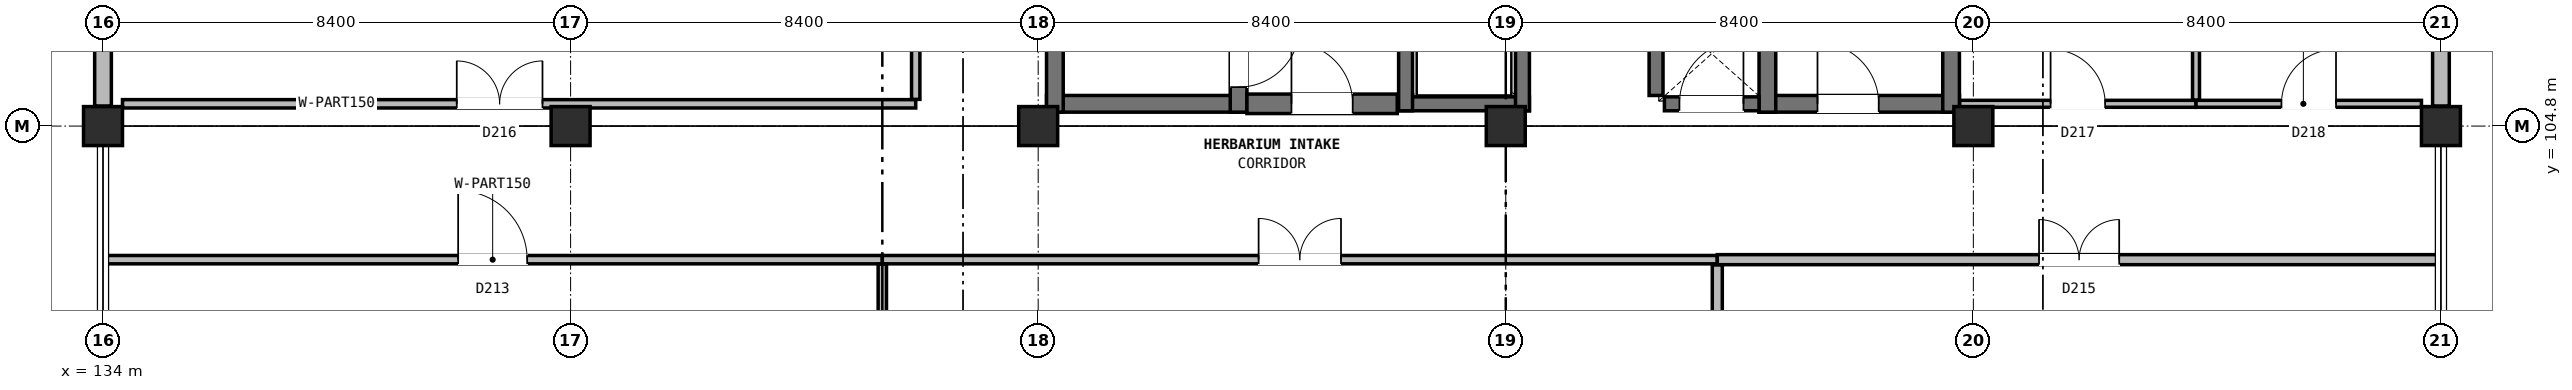
"""IFC4 building model, lengths in metres.
Left out: names, types, materials, properties, quantities, classifications, styles, units other than length and angle.
Written with IfcOpenShell. Run it as: python <this file> out.ifc"""

import sys

from ifc_helpers import new_model, si_unit, direction, frame, frame_2d, origin, origin_2d, place, context, subcontext, project, spatial, rectangle, extrude, element, fill, save


model = new_model("IFC4")
c1 = context("Model", 3, precision=1e-05, world=origin(), true_north=direction((0.0, 1.0)))
c2 = subcontext(c1, "Body", "Model", "MODEL_VIEW")
j1 = project(units=[si_unit("LENGTHUNIT", "METRE"), si_unit("PLANEANGLEUNIT", "RADIAN")], contexts=[c1])
p1 = place(None, origin())
s1 = spatial("IfcSite", under=j1, at=p1, CompositionType="ELEMENT")
p2 = place(p1, origin())
s2 = spatial("IfcBuilding", under=s1, at=p2, CompositionType="ELEMENT")
p3 = place(p2, frame((0.0, 0.0, 24.8)))
s3 = spatial("IfcBuildingStorey", under=s2, at=p3, CompositionType="ELEMENT", Elevation=24.8)
for number, where, z_axis, x_axis in (
    (1, (134.0, 104.8, 0.0), (0.0, 0.0, 1.0), (1.0, 0.0, 0.0)),
    (2, (142.4, 104.8, 0.0), (0.0, 0.0, 1.0), (1.0, 0.0, 0.0)),
    (3, (150.8, 104.8, 0.0), (0.0, 0.0, 1.0), (1.0, 0.0, 0.0)),
    (4, (159.2, 104.8, 0.0), (0.0, 0.0, 1.0), (1.0, 0.0, 0.0)),
    (5, (167.6, 104.8, 0.0), (0.0, 0.0, 1.0), (1.0, 0.0, 0.0)),
    (6, (176.0, 104.8, 0.0), (0.0, 0.0, 1.0), (1.0, 0.0, 0.0)),
):
    element("IfcColumn", number, at=place(p3, frame(where, z_axis=z_axis, x_axis=x_axis)), inside=s3, PredefinedType="COLUMN", context=c2, shape_type="SweptSolid", body=[
        extrude(rectangle(XDim=0.7, YDim=0.7, at=origin_2d()), origin(), (0.0, 0.0, 1.0), 4.0),
    ])
p4 = place(p3, frame((176.0, 105.16, 0.0), z_axis=(0.0, 0.0, 1.0), x_axis=(0.0, 1.0, 0.0)))
e7 = element("IfcWall", 7, at=p4, inside=s3, PredefinedType="SOLIDWALL", context=c2, shape_type="SweptSolid", body=[
    extrude(rectangle(XDim=8.08, YDim=0.3, at=frame_2d((4.04, 0.0))), origin(), (0.0, 0.0, 1.0), 3.15),
])
p5 = place(p4, frame((3.48, 0.0, 0.9)))
e8 = element("IfcOpeningElement", 8, at=p5, cuts=e7, PredefinedType="OPENING", context=c2, shape_type="SweptSolid", body=[
    extrude(rectangle(XDim=1.16, YDim=1.74, at=frame_2d((0.58, 0.87))), frame((0.0, 0.16, 0.0), z_axis=(0.0, -1.0, 0.0), x_axis=(1.0, 0.0, 0.0)), (0.0, 0.0, 1.0), 0.32),
])
p6 = place(p3, frame((134.0, 113.24, 0.0), z_axis=(0.0, 0.0, 1.0), x_axis=(0.0, -1.0, 0.0)))
e9 = element("IfcWall", 9, at=p6, inside=s3, PredefinedType="SOLIDWALL", context=c2, shape_type="SweptSolid", body=[
    extrude(rectangle(XDim=8.08, YDim=0.3, at=frame_2d((4.04, 0.0))), origin(), (0.0, 0.0, 1.0), 3.15),
])
p7 = place(p6, frame((2.98, 0.0, 0.9)))
e10 = element("IfcOpeningElement", 10, at=p7, cuts=e9, PredefinedType="OPENING", context=c2, shape_type="SweptSolid", body=[
    extrude(rectangle(XDim=2.08, YDim=2.04, at=frame_2d((1.04, 1.02))), frame((0.0, 0.16, 0.0), z_axis=(0.0, -1.0, 0.0), x_axis=(1.0, 0.0, 0.0)), (0.0, 0.0, 1.0), 0.32),
])
p8 = place(p3, frame((150.95, 105.2, 0.0), z_axis=(0.0, 0.0, 1.0), x_axis=(1.0, 0.0, 0.0)))
e11 = element("IfcWall", 11, at=p8, inside=s3, PredefinedType="SHEAR", context=c2, shape_type="SweptSolid", body=[
    extrude(rectangle(XDim=3.6, YDim=0.3, at=frame_2d((1.8, 0.0))), origin(), (0.0, 0.0, 1.0), 4.0),
])
p9 = place(p3, frame((151.1, 105.05, 0.0), z_axis=(0.0, 0.0, 1.0), x_axis=(0.0, 1.0, 0.0)))
e12 = element("IfcWall", 12, at=p9, inside=s3, PredefinedType="SHEAR", context=c2, shape_type="SweptSolid", body=[
    extrude(rectangle(XDim=8.3, YDim=0.3, at=frame_2d((4.15, 0.0))), origin(), (0.0, 0.0, 1.0), 4.0),
])
p10 = place(p3, frame((154.4, 105.05, 0.0), z_axis=(0.0, 0.0, 1.0), x_axis=(0.0, 1.0, 0.0)))
e13 = element("IfcWall", 13, at=p10, inside=s3, PredefinedType="SHEAR", context=c2, shape_type="SweptSolid", body=[
    extrude(rectangle(XDim=8.3, YDim=0.3, at=frame_2d((4.15, 0.0))), origin(), (0.0, 0.0, 1.0), 4.0),
])
p11 = place(p10, frame((0.45, 0.0, 0.0)))
e14 = element("IfcOpeningElement", 14, at=p11, cuts=e13, PredefinedType="OPENING", context=c2, shape_type="SweptSolid", body=[
    extrude(rectangle(XDim=1.1, YDim=2.2, at=frame_2d((0.55, 1.1))), frame((0.0, 0.16, 0.0), z_axis=(0.0, -1.0, 0.0), x_axis=(1.0, 0.0, 0.0)), (0.0, 0.0, 1.0), 0.32),
])
p12 = place(p3, frame((163.75, 105.2, 0.0), z_axis=(0.0, 0.0, 1.0), x_axis=(1.0, 0.0, 0.0)))
e15 = element("IfcWall", 15, at=p12, inside=s3, PredefinedType="SHEAR", context=c2, shape_type="SweptSolid", body=[
    extrude(rectangle(XDim=3.6, YDim=0.3, at=frame_2d((1.8, 0.0))), origin(), (0.0, 0.0, 1.0), 4.0),
])
p13 = place(p12, frame((1.05, 0.0, 0.0)))
e16 = element("IfcOpeningElement", 16, at=p13, cuts=e15, PredefinedType="OPENING", context=c2, shape_type="SweptSolid", body=[
    extrude(rectangle(XDim=1.1, YDim=2.2, at=frame_2d((0.55, 1.1))), frame((0.0, 0.16, 0.0), z_axis=(0.0, -1.0, 0.0), x_axis=(1.0, 0.0, 0.0)), (0.0, 0.0, 1.0), 0.32),
])
for number, where, z_axis, x_axis in (
    (17, (163.9, 105.05, 0.0), (0.0, 0.0, 1.0), (0.0, 1.0, 0.0)),
    (18, (167.2, 105.05, 0.0), (0.0, 0.0, 1.0), (0.0, 1.0, 0.0)),
):
    element("IfcWall", number, at=place(p3, frame(where, z_axis=z_axis, x_axis=x_axis)), inside=s3, PredefinedType="SHEAR", context=c2, shape_type="SweptSolid", body=[
        extrude(rectangle(XDim=8.3, YDim=0.3, at=frame_2d((4.15, 0.0))), origin(), (0.0, 0.0, 1.0), 4.0),
    ])
p14 = place(p3, frame((157.275, 105.2, 0.0), z_axis=(0.0, 0.0, 1.0), x_axis=(1.0, 0.0, 0.0)))
e19 = element("IfcWall", 19, at=p14, inside=s3, PredefinedType="SOLIDWALL", context=c2, shape_type="SweptSolid", body=[
    extrude(rectangle(XDim=2.35, YDim=0.25, at=frame_2d((1.175, 0.0))), origin(), (0.0, 0.0, 1.0), 3.68),
])
for number, where, z_axis, x_axis in (
    (20, (157.4, 105.075, 0.0), (0.0, 0.0, 1.0), (0.0, 1.0, 0.0)),
    (21, (159.5, 105.075, 0.0), (0.0, 0.0, 1.0), (0.0, 1.0, 0.0)),
):
    element("IfcWall", number, at=place(p3, frame(where, z_axis=z_axis, x_axis=x_axis)), inside=s3, PredefinedType="SOLIDWALL", context=c2, shape_type="SweptSolid", body=[
        extrude(rectangle(XDim=2.65, YDim=0.25, at=frame_2d((1.325, 0.0))), origin(), (0.0, 0.0, 1.0), 3.68),
    ])
p15 = place(p3, frame((154.55, 105.2, 0.0), z_axis=(0.0, 0.0, 1.0), x_axis=(1.0, 0.0, 0.0)))
e22 = element("IfcWall", 22, at=p15, inside=s3, PredefinedType="SHEAR", context=c2, shape_type="SweptSolid", body=[
    extrude(rectangle(XDim=2.7, YDim=0.35, at=frame_2d((1.35, 0.0))), origin(), (0.0, 0.0, 1.0), 3.68),
])
p16 = place(p15, frame((0.8, 0.0, 0.0)))
e23 = element("IfcOpeningElement", 23, at=p16, cuts=e22, PredefinedType="OPENING", context=c2, shape_type="SweptSolid", body=[
    extrude(rectangle(XDim=1.1, YDim=2.2, at=frame_2d((0.55, 1.1))), frame((0.0, 0.185, 0.0), z_axis=(0.0, -1.0, 0.0), x_axis=(1.0, 0.0, 0.0)), (0.0, 0.0, 1.0), 0.37),
])
p17 = place(p3, frame((161.9, 105.35, 0.0), z_axis=(0.0, 0.0, 1.0), x_axis=(0.0, 1.0, 0.0)))
e24 = element("IfcWall", 24, at=p17, inside=s3, PredefinedType="SOLIDWALL", context=c2, shape_type="SweptSolid", body=[
    extrude(rectangle(XDim=1.5, YDim=0.25, at=frame_2d((0.75, 0.0))), origin(), (0.0, 0.0, 1.0), 3.68),
])
p18 = place(p3, frame((162.05, 105.2, 0.0), z_axis=(0.0, 0.0, 1.0), x_axis=(1.0, 0.0, 0.0)))
e25 = element("IfcWall", 25, at=p18, inside=s3, PredefinedType="SOLIDWALL", context=c2, shape_type="SweptSolid", body=[
    extrude(rectangle(XDim=1.7, YDim=0.25, at=frame_2d((0.85, 0.0))), origin(), (0.0, 0.0, 1.0), 3.68),
])
p19 = place(p18, frame((0.27, 0.0, 0.0)))
e26 = element("IfcOpeningElement", 26, at=p19, cuts=e25, PredefinedType="OPENING", context=c2, shape_type="SweptSolid", body=[
    extrude(rectangle(XDim=1.15, YDim=2.2, at=frame_2d((0.575, 1.1))), frame((0.0, 0.135, 0.0), z_axis=(0.0, -1.0, 0.0), x_axis=(1.0, 0.0, 0.0)), (0.0, 0.0, 1.0), 0.27),
])
p20 = place(p3, frame((134.0, 102.4, 0.0), z_axis=(0.0, 0.0, 1.0), x_axis=(1.0, 0.0, 0.0)))
e27 = element("IfcWall", 27, at=p20, inside=s3, PredefinedType="PARTITIONING", context=c2, shape_type="SweptSolid", body=[
    extrude(rectangle(XDim=14.0, YDim=0.15, at=frame_2d((7.0, 0.0))), origin(), (0.0, 0.0, 1.0), 3.665),
])
p21 = place(p20, frame((6.38, 0.0, 0.0)))
e28 = element("IfcOpeningElement", 28, at=p21, cuts=e27, PredefinedType="OPENING", context=c2, shape_type="SweptSolid", body=[
    extrude(rectangle(XDim=1.24, YDim=2.26, at=frame_2d((0.62, 1.13))), frame((0.0, 0.085, 0.0), z_axis=(0.0, -1.0, 0.0), x_axis=(1.0, 0.0, 0.0)), (0.0, 0.0, 1.0), 0.17),
])
p22 = place(p3, frame((148.0, 102.4, 0.0), z_axis=(0.0, 0.0, 1.0), x_axis=(1.0, 0.0, 0.0)))
e29 = element("IfcWall", 29, at=p22, inside=s3, PredefinedType="PARTITIONING", context=c2, shape_type="SweptSolid", body=[
    extrude(rectangle(XDim=15.0, YDim=0.15, at=frame_2d((7.5, 0.0))), origin(), (0.0, 0.0, 1.0), 3.665),
])
p23 = place(p22, frame((6.76, 0.0, 0.0)))
e30 = element("IfcOpeningElement", 30, at=p23, cuts=e29, PredefinedType="OPENING", context=c2, shape_type="SweptSolid", body=[
    extrude(rectangle(XDim=1.48, YDim=2.2, at=frame_2d((0.74, 1.1))), frame((0.0, 0.085, 0.0), z_axis=(0.0, -1.0, 0.0), x_axis=(1.0, 0.0, 0.0)), (0.0, 0.0, 1.0), 0.17),
])
p24 = place(p3, frame((163.0, 102.4, 0.0), z_axis=(0.0, 0.0, 1.0), x_axis=(1.0, 0.0, 0.0)))
e31 = element("IfcWall", 31, at=p24, inside=s3, PredefinedType="PARTITIONING", context=c2, shape_type="SweptSolid", body=[
    extrude(rectangle(XDim=13.0, YDim=0.18, at=frame_2d((6.5, 0.0))), origin(), (0.0, 0.0, 1.0), 3.665),
])
p25 = place(p24, frame((5.78, 0.0, 0.0)))
e32 = element("IfcOpeningElement", 32, at=p25, cuts=e31, PredefinedType="OPENING", context=c2, shape_type="SweptSolid", body=[
    extrude(rectangle(XDim=1.44, YDim=2.26, at=frame_2d((0.72, 1.13))), frame((0.0, 0.1, 0.0), z_axis=(0.0, -1.0, 0.0), x_axis=(1.0, 0.0, 0.0)), (0.0, 0.0, 1.0), 0.2),
])
p26 = place(p3, frame((134.35, 105.2, 0.0), z_axis=(0.0, 0.0, 1.0), x_axis=(1.0, 0.0, 0.0)))
e33 = element("IfcWall", 33, at=p26, inside=s3, PredefinedType="PARTITIONING", context=c2, shape_type="SweptSolid", body=[
    extrude(rectangle(XDim=14.25, YDim=0.15, at=frame_2d((7.125, 0.0))), origin(), (0.0, 0.0, 1.0), 3.145),
])
p27 = place(p26, frame((6.005, 0.0, 0.0)))
e34 = element("IfcOpeningElement", 34, at=p27, cuts=e33, PredefinedType="OPENING", context=c2, shape_type="SweptSolid", body=[
    extrude(rectangle(XDim=1.54, YDim=2.3, at=frame_2d((0.77, 1.15))), frame((0.0, 0.085, 0.0), z_axis=(0.0, -1.0, 0.0), x_axis=(1.0, 0.0, 0.0)), (0.0, 0.0, 1.0), 0.17),
])
p28 = place(p3, frame((167.355, 105.2, 0.0), z_axis=(0.0, 0.0, 1.0), x_axis=(1.0, 0.0, 0.0)))
e35 = element("IfcWall", 35, at=p28, inside=s3, PredefinedType="PARTITIONING", context=c2, shape_type="SweptSolid", body=[
    extrude(rectangle(XDim=4.245, YDim=0.125, at=frame_2d((2.123, 0.0))), origin(), (0.0, 0.0, 1.0), 3.145),
])
p29 = place(p28, frame((1.633, 0.0, 0.0)))
e36 = element("IfcOpeningElement", 36, at=p29, cuts=e35, PredefinedType="OPENING", context=c2, shape_type="SweptSolid", body=[
    extrude(rectangle(XDim=0.98, YDim=2.1, at=frame_2d((0.49, 1.05))), frame((0.0, 0.073, 0.0), z_axis=(0.0, -1.0, 0.0), x_axis=(1.0, 0.0, 0.0)), (0.0, 0.0, 1.0), 0.145),
])
p30 = place(p3, frame((171.6, 105.2, 0.0), z_axis=(0.0, 0.0, 1.0), x_axis=(1.0, 0.0, 0.0)))
e37 = element("IfcWall", 37, at=p30, inside=s3, PredefinedType="PARTITIONING", context=c2, shape_type="SweptSolid", body=[
    extrude(rectangle(XDim=4.05, YDim=0.125, at=frame_2d((2.025, 0.0))), origin(), (0.0, 0.0, 1.0), 3.145),
])
p31 = place(p30, frame((1.535, 0.0, 0.0)))
e38 = element("IfcOpeningElement", 38, at=p31, cuts=e37, PredefinedType="OPENING", context=c2, shape_type="SweptSolid", body=[
    extrude(rectangle(XDim=0.98, YDim=2.1, at=frame_2d((0.49, 1.05))), frame((0.0, 0.073, 0.0), z_axis=(0.0, -1.0, 0.0), x_axis=(1.0, 0.0, 0.0)), (0.0, 0.0, 1.0), 0.145),
])
p32 = place(p3, frame((148.6, 105.28, 0.0), z_axis=(0.0, 0.0, 1.0), x_axis=(0.0, 1.0, 0.0)))
e39 = element("IfcWall", 39, at=p32, inside=s3, PredefinedType="PARTITIONING", context=c2, shape_type="SweptSolid", body=[
    extrude(rectangle(XDim=14.12, YDim=0.15, at=frame_2d((7.06, 0.0))), origin(), (0.0, 0.0, 1.0), 3.665),
])
p33 = place(p3, frame((148.0, 87.355, 0.0), z_axis=(0.0, 0.0, 1.0), x_axis=(0.0, 1.0, 0.0)))
e40 = element("IfcWall", 40, at=p33, inside=s3, PredefinedType="PARTITIONING", context=c2, shape_type="SweptSolid", body=[
    extrude(rectangle(XDim=14.965, YDim=0.15, at=frame_2d((7.482, 0.0))), origin(), (0.0, 0.0, 1.0), 3.665),
])
p34 = place(p3, frame((163.0, 87.355, 0.0), z_axis=(0.0, 0.0, 1.0), x_axis=(0.0, 1.0, 0.0)))
e41 = element("IfcWall", 41, at=p34, inside=s3, PredefinedType="PARTITIONING", context=c2, shape_type="SweptSolid", body=[
    extrude(rectangle(XDim=14.95, YDim=0.18, at=frame_2d((7.475, 0.0))), origin(), (0.0, 0.0, 1.0), 3.665),
])
p35 = place(p3, frame((171.6, 105.268, 0.0), z_axis=(0.0, 0.0, 1.0), x_axis=(0.0, 1.0, 0.0)))
e42 = element("IfcWall", 42, at=p35, inside=s3, PredefinedType="PARTITIONING", context=c2, shape_type="SweptSolid", body=[
    extrude(rectangle(XDim=16.978, YDim=0.125, at=frame_2d((8.489, 0.0))), origin(), (0.0, 0.0, 1.0), 3.665),
])
p36 = place(p11, frame((1.1, 0.0, 0.0), z_axis=(0.0, 0.0, 1.0), x_axis=(-1.0, 0.0, 0.0)))
e43 = element("IfcDoor", 43, at=p36, inside=s3, OperationType="SINGLE_SWING_RIGHT", PredefinedType="DOOR", context=c2, shape_type="SweptSolid", body=[
    extrude(rectangle(XDim=1.1, YDim=2.2, at=frame_2d((0.55, 1.1))), frame((0.0, 0.025, 0.0), z_axis=(0.0, -1.0, 0.0), x_axis=(1.0, 0.0, 0.0)), (0.0, 0.0, 1.0), 0.05),
])
fill(e14, e43)
p37 = place(p13, origin())
e44 = element("IfcDoor", 44, at=p37, inside=s3, OperationType="SINGLE_SWING_LEFT", PredefinedType="DOOR", context=c2, shape_type="SweptSolid", body=[
    extrude(rectangle(XDim=1.1, YDim=2.2, at=frame_2d((0.55, 1.1))), frame((0.0, 0.025, 0.0), z_axis=(0.0, -1.0, 0.0), x_axis=(1.0, 0.0, 0.0)), (0.0, 0.0, 1.0), 0.05),
])
fill(e16, e44)
p38 = place(p16, origin())
e45 = element("IfcDoor", 45, at=p38, inside=s3, OperationType="SINGLE_SWING_LEFT", PredefinedType="DOOR", context=c2, shape_type="SweptSolid", body=[
    extrude(rectangle(XDim=1.1, YDim=2.2, at=frame_2d((0.55, 1.1))), frame((0.0, 0.025, 0.0), z_axis=(0.0, -1.0, 0.0), x_axis=(1.0, 0.0, 0.0)), (0.0, 0.0, 1.0), 0.05),
])
fill(e23, e45)
p39 = place(p19, origin())
e46 = element("IfcDoor", 46, at=p39, inside=s3, OperationType="SINGLE_SWING_RIGHT", PredefinedType="DOOR", context=c2, shape_type="SweptSolid", body=[
    extrude(rectangle(XDim=1.15, YDim=2.2, at=frame_2d((0.575, 1.1))), frame((0.0, 0.025, 0.0), z_axis=(0.0, -1.0, 0.0), x_axis=(1.0, 0.0, 0.0)), (0.0, 0.0, 1.0), 0.05),
])
fill(e26, e46)
p40 = place(p21, origin())
e47 = element("IfcDoor", 47, at=p40, inside=s3, OperationType="SINGLE_SWING_LEFT", PredefinedType="DOOR", context=c2, shape_type="SweptSolid", body=[
    extrude(rectangle(XDim=1.24, YDim=2.26, at=frame_2d((0.62, 1.13))), frame((0.0, 0.025, 0.0), z_axis=(0.0, -1.0, 0.0), x_axis=(1.0, 0.0, 0.0)), (0.0, 0.0, 1.0), 0.05),
])
fill(e28, e47)
p41 = place(p23, origin())
e48 = element("IfcDoor", 48, at=p41, inside=s3, OperationType="DOUBLE_DOOR_SINGLE_SWING", PredefinedType="DOOR", context=c2, shape_type="SweptSolid", body=[
    extrude(rectangle(XDim=1.48, YDim=2.2, at=frame_2d((0.74, 1.1))), frame((0.0, 0.025, 0.0), z_axis=(0.0, -1.0, 0.0), x_axis=(1.0, 0.0, 0.0)), (0.0, 0.0, 1.0), 0.05),
])
fill(e30, e48)
p42 = place(p25, origin())
e49 = element("IfcDoor", 49, at=p42, inside=s3, OperationType="DOUBLE_DOOR_SINGLE_SWING", PredefinedType="DOOR", context=c2, shape_type="SweptSolid", body=[
    extrude(rectangle(XDim=1.44, YDim=2.26, at=frame_2d((0.72, 1.13))), frame((0.0, 0.025, 0.0), z_axis=(0.0, -1.0, 0.0), x_axis=(1.0, 0.0, 0.0)), (0.0, 0.0, 1.0), 0.05),
])
fill(e32, e49)
p43 = place(p27, origin())
e50 = element("IfcDoor", 50, at=p43, inside=s3, OperationType="DOUBLE_DOOR_SINGLE_SWING", PredefinedType="DOOR", context=c2, shape_type="SweptSolid", body=[
    extrude(rectangle(XDim=1.54, YDim=2.3, at=frame_2d((0.77, 1.15))), frame((0.0, 0.025, 0.0), z_axis=(0.0, -1.0, 0.0), x_axis=(1.0, 0.0, 0.0)), (0.0, 0.0, 1.0), 0.05),
])
fill(e34, e50)
p44 = place(p29, origin())
e51 = element("IfcDoor", 51, at=p44, inside=s3, OperationType="SINGLE_SWING_LEFT", PredefinedType="DOOR", context=c2, shape_type="SweptSolid", body=[
    extrude(rectangle(XDim=0.98, YDim=2.1, at=frame_2d((0.49, 1.05))), frame((0.0, 0.025, 0.0), z_axis=(0.0, -1.0, 0.0), x_axis=(1.0, 0.0, 0.0)), (0.0, 0.0, 1.0), 0.05),
])
fill(e36, e51)
p45 = place(p31, origin())
e52 = element("IfcDoor", 52, at=p45, inside=s3, OperationType="SINGLE_SWING_RIGHT", PredefinedType="DOOR", context=c2, shape_type="SweptSolid", body=[
    extrude(rectangle(XDim=0.98, YDim=2.1, at=frame_2d((0.49, 1.05))), frame((0.0, 0.025, 0.0), z_axis=(0.0, -1.0, 0.0), x_axis=(1.0, 0.0, 0.0)), (0.0, 0.0, 1.0), 0.05),
])
fill(e38, e52)
save(model, sys.argv[1])
